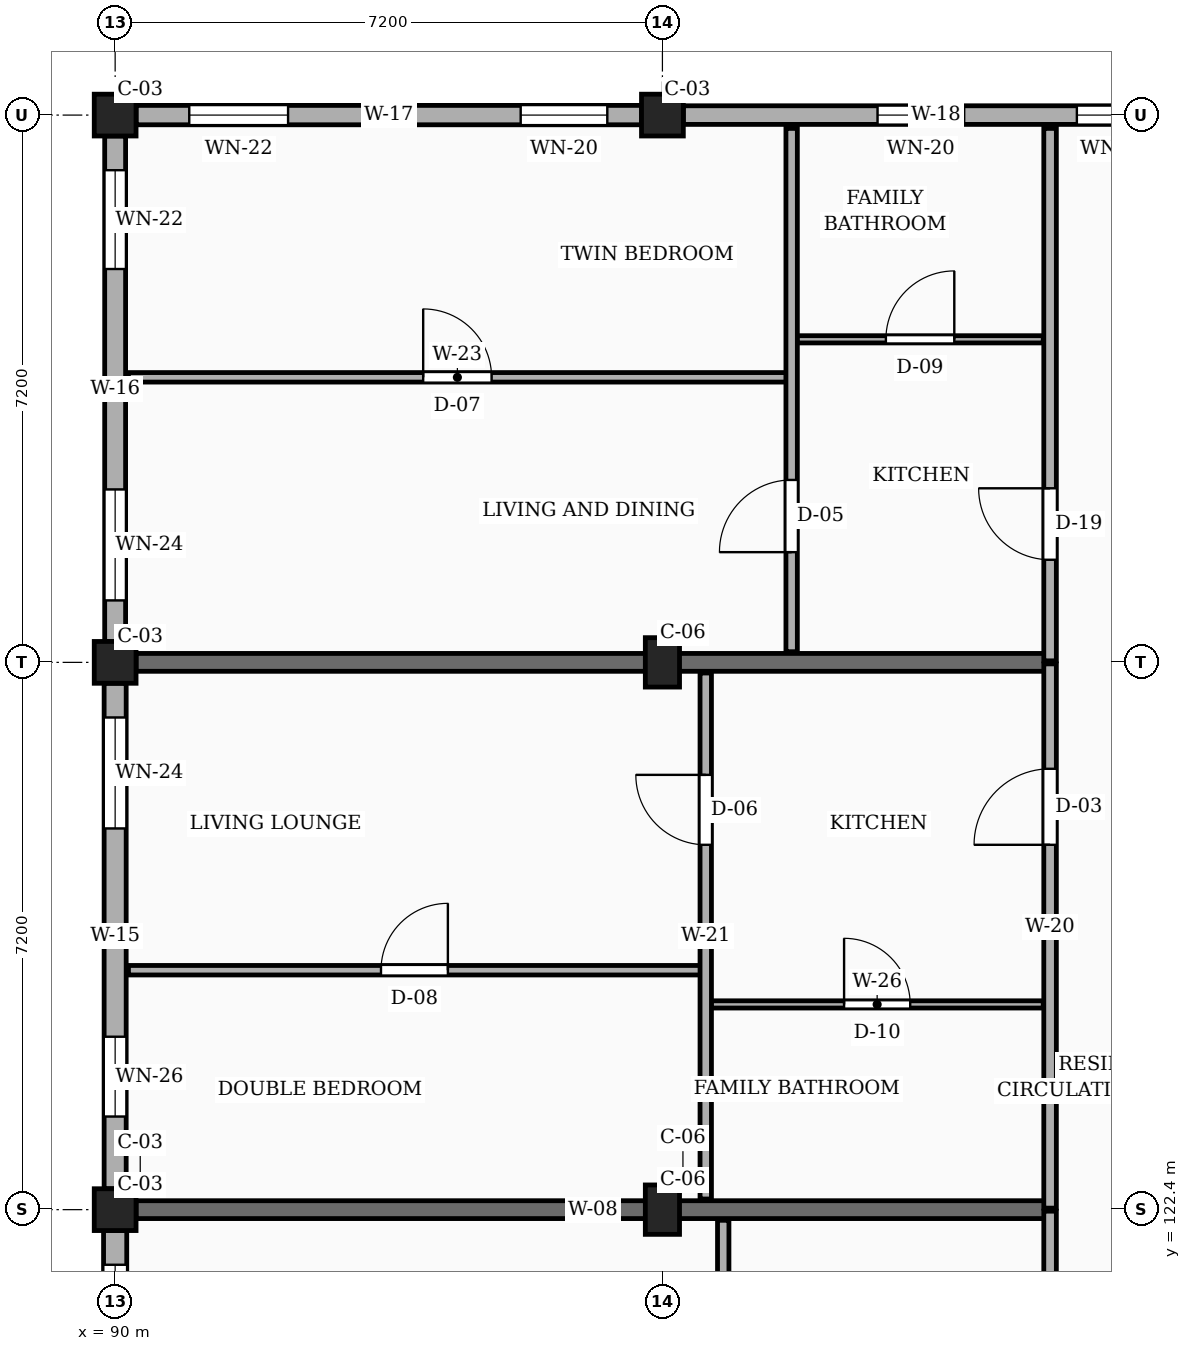
"""IFC4 building model, lengths in metres.
Left out: names, types, materials, properties, quantities, classifications, styles, units other than length and angle.
Written with IfcOpenShell. Run it as: python <this file> out.ifc"""

import sys

from ifc_helpers import new_model, si_unit, direction, frame, frame_2d, origin, origin_2d, place, context, subcontext, project, spatial, rectangle, extrude, element, fill, save


model = new_model("IFC4")
c1 = context("Model", 3, precision=1e-05, world=origin(), true_north=direction((0.0, 1.0)))
c2 = subcontext(c1, "Body", "Model", "MODEL_VIEW")
j1 = project(units=[si_unit("LENGTHUNIT", "METRE"), si_unit("PLANEANGLEUNIT", "RADIAN")], contexts=[c1])
p1 = place(None, origin())
s1 = spatial("IfcSite", under=j1, at=p1, CompositionType="ELEMENT")
p2 = place(p1, origin())
s2 = spatial("IfcBuilding", under=s1, at=p2, CompositionType="ELEMENT")
p3 = place(p2, frame((0.0, 0.0, 17.1)))
s3 = spatial("IfcBuildingStorey", under=s2, at=p3, CompositionType="ELEMENT", Elevation=17.1)
for number, where, z_axis, x_axis in (
    (1, (90.0, 122.4, 0.0), (0.0, 0.0, 1.0), (1.0, 0.0, 0.0)),
    (2, (90.0, 129.6, 0.0), (0.0, 0.0, 1.0), (1.0, 0.0, 0.0)),
    (3, (90.0, 136.8, 0.0), (0.0, 0.0, 1.0), (1.0, 0.0, 0.0)),
):
    element("IfcColumn", number, at=place(p3, frame(where, z_axis=z_axis, x_axis=x_axis)), inside=s3, PredefinedType="COLUMN", context=c2, shape_type="SweptSolid", body=[
        extrude(rectangle(XDim=0.55, YDim=0.55, at=origin_2d()), origin(), (0.0, 0.0, 1.0), 3.15),
    ])
for number, where, z_axis, x_axis in (
    (4, (97.2, 122.4, 0.0), (0.0, 0.0, 1.0), (1.0, 0.0, 0.0)),
    (5, (97.2, 129.6, 0.0), (0.0, 0.0, 1.0), (1.0, 0.0, 0.0)),
):
    element("IfcColumn", number, at=place(p3, frame(where, z_axis=z_axis, x_axis=x_axis)), inside=s3, PredefinedType="COLUMN", context=c2, shape_type="SweptSolid", body=[
        extrude(rectangle(XDim=0.45, YDim=0.65, at=origin_2d()), origin(), (0.0, 0.0, 1.0), 3.15),
    ])
p4 = place(p3, frame((97.2, 136.8, 0.0), z_axis=(0.0, 0.0, 1.0), x_axis=(1.0, 0.0, 0.0)))
e6 = element("IfcColumn", 6, at=p4, inside=s3, PredefinedType="COLUMN", context=c2, shape_type="SweptSolid", body=[
    extrude(rectangle(XDim=0.55, YDim=0.55, at=origin_2d()), origin(), (0.0, 0.0, 1.0), 3.15),
])
for number, where, z_axis, x_axis in (
    (7, (90.275, 122.4, 0.0), (0.0, 0.0, 1.0), (1.0, 0.0, 0.0)),
    (8, (90.275, 129.6, 0.0), (0.0, 0.0, 1.0), (1.0, 0.0, 0.0)),
):
    element("IfcWall", number, at=place(p3, frame(where, z_axis=z_axis, x_axis=x_axis)), inside=s3, PredefinedType="SOLIDWALL", context=c2, shape_type="SweptSolid", body=[
        extrude(rectangle(XDim=12.025, YDim=0.235, at=frame_2d((6.013, 0.0))), origin(), (0.0, 0.0, 1.0), 2.19),
    ])
p5 = place(p3, frame((104.125, 136.8, 0.0), z_axis=(0.0, 0.0, 1.0), x_axis=(-1.0, 0.0, 0.0)))
e9 = element("IfcWall", 9, at=p5, inside=s3, PredefinedType="SOLIDWALL", context=c2, shape_type="SweptSolid", body=[
    extrude(rectangle(XDim=6.65, YDim=0.245, at=frame_2d((3.325, 0.0))), origin(), (0.0, 0.0, 1.0), 2.46),
])
p6 = place(p5, frame((0.492, 0.0, 0.78)))
e10 = element("IfcOpeningElement", 10, at=p6, cuts=e9, PredefinedType="OPENING", context=c2, shape_type="SweptSolid", body=[
    extrude(rectangle(XDim=0.98, YDim=1.36, at=frame_2d((0.49, 0.68))), frame((0.0, 0.133, 0.0), z_axis=(0.0, -1.0, 0.0), x_axis=(1.0, 0.0, 0.0)), (0.0, 0.0, 1.0), 0.265),
])
p7 = place(p5, frame((2.955, 0.0, 0.78)))
e11 = element("IfcOpeningElement", 11, at=p7, cuts=e9, PredefinedType="OPENING", context=c2, shape_type="SweptSolid", body=[
    extrude(rectangle(XDim=1.14, YDim=1.36, at=frame_2d((0.57, 0.68))), frame((0.0, 0.133, 0.0), z_axis=(0.0, -1.0, 0.0), x_axis=(1.0, 0.0, 0.0)), (0.0, 0.0, 1.0), 0.265),
])
p8 = place(p3, frame((96.925, 136.8, 0.0), z_axis=(0.0, 0.0, 1.0), x_axis=(-1.0, 0.0, 0.0)))
e12 = element("IfcWall", 12, at=p8, inside=s3, PredefinedType="SOLIDWALL", context=c2, shape_type="SweptSolid", body=[
    extrude(rectangle(XDim=6.65, YDim=0.255, at=frame_2d((3.325, 0.0))), origin(), (0.0, 0.0, 1.0), 2.46),
])
p9 = place(p8, frame((0.45, 0.0, 0.78)))
e13 = element("IfcOpeningElement", 13, at=p9, cuts=e12, PredefinedType="OPENING", context=c2, shape_type="SweptSolid", body=[
    extrude(rectangle(XDim=1.14, YDim=1.36, at=frame_2d((0.57, 0.68))), frame((0.0, 0.137, 0.0), z_axis=(0.0, -1.0, 0.0), x_axis=(1.0, 0.0, 0.0)), (0.0, 0.0, 1.0), 0.275),
])
p10 = place(p8, frame((4.65, 0.0, 0.78)))
e14 = element("IfcOpeningElement", 14, at=p10, cuts=e12, PredefinedType="OPENING", context=c2, shape_type="SweptSolid", body=[
    extrude(rectangle(XDim=1.3, YDim=1.36, at=frame_2d((0.65, 0.68))), frame((0.0, 0.137, 0.0), z_axis=(0.0, -1.0, 0.0), x_axis=(1.0, 0.0, 0.0)), (0.0, 0.0, 1.0), 0.275),
])
p11 = place(p3, frame((90.0, 136.525, 0.0), z_axis=(0.0, 0.0, 1.0), x_axis=(0.0, -1.0, 0.0)))
e15 = element("IfcWall", 15, at=p11, inside=s3, PredefinedType="SOLIDWALL", context=c2, shape_type="SweptSolid", body=[
    extrude(rectangle(XDim=6.65, YDim=0.275, at=frame_2d((3.325, 0.0))), origin(), (0.0, 0.0, 1.0), 2.46),
])
p12 = place(p11, frame((0.45, 0.0, 0.78)))
e16 = element("IfcOpeningElement", 16, at=p12, cuts=e15, PredefinedType="OPENING", context=c2, shape_type="SweptSolid", body=[
    extrude(rectangle(XDim=1.3, YDim=1.36, at=frame_2d((0.65, 0.68))), frame((0.0, 0.147, 0.0), z_axis=(0.0, -1.0, 0.0), x_axis=(1.0, 0.0, 0.0)), (0.0, 0.0, 1.0), 0.295),
])
p13 = place(p11, frame((4.65, 0.0, 0.78)))
e17 = element("IfcOpeningElement", 17, at=p13, cuts=e15, PredefinedType="OPENING", context=c2, shape_type="SweptSolid", body=[
    extrude(rectangle(XDim=1.46, YDim=1.36, at=frame_2d((0.73, 0.68))), frame((0.0, 0.147, 0.0), z_axis=(0.0, -1.0, 0.0), x_axis=(1.0, 0.0, 0.0)), (0.0, 0.0, 1.0), 0.295),
])
p14 = place(p3, frame((90.0, 129.325, 0.0), z_axis=(0.0, 0.0, 1.0), x_axis=(0.0, -1.0, 0.0)))
e18 = element("IfcWall", 18, at=p14, inside=s3, PredefinedType="SOLIDWALL", context=c2, shape_type="SweptSolid", body=[
    extrude(rectangle(XDim=6.65, YDim=0.29, at=frame_2d((3.325, 0.0))), origin(), (0.0, 0.0, 1.0), 2.46),
])
p15 = place(p14, frame((0.45, 0.0, 0.78)))
e19 = element("IfcOpeningElement", 19, at=p15, cuts=e18, PredefinedType="OPENING", context=c2, shape_type="SweptSolid", body=[
    extrude(rectangle(XDim=1.46, YDim=1.36, at=frame_2d((0.73, 0.68))), frame((0.0, 0.155, 0.0), z_axis=(0.0, -1.0, 0.0), x_axis=(1.0, 0.0, 0.0)), (0.0, 0.0, 1.0), 0.31),
])
p16 = place(p14, frame((4.65, 0.0, 0.78)))
e20 = element("IfcOpeningElement", 20, at=p16, cuts=e18, PredefinedType="OPENING", context=c2, shape_type="SweptSolid", body=[
    extrude(rectangle(XDim=1.05, YDim=1.44, at=frame_2d((0.525, 0.72))), frame((0.0, 0.155, 0.0), z_axis=(0.0, -1.0, 0.0), x_axis=(1.0, 0.0, 0.0)), (0.0, 0.0, 1.0), 0.31),
])
p17 = place(p3, frame((90.0, 122.125, 0.0), z_axis=(0.0, 0.0, 1.0), x_axis=(0.0, -1.0, 0.0)))
e21 = element("IfcWall", 21, at=p17, inside=s3, PredefinedType="SOLIDWALL", context=c2, shape_type="SweptSolid", body=[
    extrude(rectangle(XDim=6.65, YDim=0.305, at=frame_2d((3.325, 0.0))), origin(), (0.0, 0.0, 1.0), 2.46),
])
p18 = place(p17, frame((0.45, 0.0, 0.78)))
e22 = element("IfcOpeningElement", 22, at=p18, cuts=e21, PredefinedType="OPENING", context=c2, shape_type="SweptSolid", body=[
    extrude(rectangle(XDim=1.05, YDim=1.44, at=frame_2d((0.525, 0.72))), frame((0.0, 0.163, 0.0), z_axis=(0.0, -1.0, 0.0), x_axis=(1.0, 0.0, 0.0)), (0.0, 0.0, 1.0), 0.325),
])
p19 = place(p17, frame((4.65, 0.0, 0.78)))
e23 = element("IfcOpeningElement", 23, at=p19, cuts=e21, PredefinedType="OPENING", context=c2, shape_type="SweptSolid", body=[
    extrude(rectangle(XDim=1.25, YDim=1.44, at=frame_2d((0.625, 0.72))), frame((0.0, 0.163, 0.0), z_axis=(0.0, -1.0, 0.0), x_axis=(1.0, 0.0, 0.0)), (0.0, 0.0, 1.0), 0.325),
])
p20 = place(p3, frame((102.3, 115.22, 0.0), z_axis=(0.0, 0.0, 1.0), x_axis=(0.0, 1.0, 0.0)))
e24 = element("IfcWall", 24, at=p20, inside=s3, PredefinedType="PARTITIONING", context=c2, shape_type="SweptSolid", body=[
    extrude(rectangle(XDim=7.16, YDim=0.165, at=frame_2d((3.58, 0.0))), origin(), (0.0, 0.0, 1.0), 2.325),
])
p21 = place(p20, frame((4.78, 0.0, 0.0)))
e25 = element("IfcOpeningElement", 25, at=p21, cuts=e24, PredefinedType="OPENING", context=c2, shape_type="SweptSolid", body=[
    extrude(rectangle(XDim=1.14, YDim=2.18, at=frame_2d((0.57, 1.09))), frame((0.0, 0.093, 0.0), z_axis=(0.0, -1.0, 0.0), x_axis=(1.0, 0.0, 0.0)), (0.0, 0.0, 1.0), 0.185),
])
p22 = place(p3, frame((102.3, 122.42, 0.0), z_axis=(0.0, 0.0, 1.0), x_axis=(0.0, 1.0, 0.0)))
e26 = element("IfcWall", 26, at=p22, inside=s3, PredefinedType="PARTITIONING", context=c2, shape_type="SweptSolid", body=[
    extrude(rectangle(XDim=7.16, YDim=0.165, at=frame_2d((3.58, 0.0))), origin(), (0.0, 0.0, 1.0), 2.325),
])
p23 = place(p22, frame((4.78, 0.0, 0.0)))
e27 = element("IfcOpeningElement", 27, at=p23, cuts=e26, PredefinedType="OPENING", context=c2, shape_type="SweptSolid", body=[
    extrude(rectangle(XDim=1.0, YDim=2.15, at=frame_2d((0.5, 1.075))), frame((0.0, 0.093, 0.0), z_axis=(0.0, -1.0, 0.0), x_axis=(1.0, 0.0, 0.0)), (0.0, 0.0, 1.0), 0.185),
])
p24 = place(p3, frame((102.3, 129.62, 0.0), z_axis=(0.0, 0.0, 1.0), x_axis=(0.0, 1.0, 0.0)))
e28 = element("IfcWall", 28, at=p24, inside=s3, PredefinedType="PARTITIONING", context=c2, shape_type="SweptSolid", body=[
    extrude(rectangle(XDim=7.005, YDim=0.165, at=frame_2d((3.502, 0.0))), origin(), (0.0, 0.0, 1.0), 2.325),
])
p25 = place(p24, frame((1.33, 0.0, 0.0)))
e29 = element("IfcOpeningElement", 29, at=p25, cuts=e28, PredefinedType="OPENING", context=c2, shape_type="SweptSolid", body=[
    extrude(rectangle(XDim=0.94, YDim=2.12, at=frame_2d((0.47, 1.06))), frame((0.0, 0.093, 0.0), z_axis=(0.0, -1.0, 0.0), x_axis=(1.0, 0.0, 0.0)), (0.0, 0.0, 1.0), 0.185),
])
p26 = place(p3, frame((98.0, 115.34, 0.0), z_axis=(0.0, 0.0, 1.0), x_axis=(0.0, 1.0, 0.0)))
e30 = element("IfcWall", 30, at=p26, inside=s3, PredefinedType="PARTITIONING", context=c2, shape_type="SweptSolid", body=[
    extrude(rectangle(XDim=6.92, YDim=0.15, at=frame_2d((3.46, 0.0))), origin(), (0.0, 0.0, 1.0), 2.325),
])
p27 = place(p26, frame((4.66, 0.0, 0.0)))
e31 = element("IfcOpeningElement", 31, at=p27, cuts=e30, PredefinedType="OPENING", context=c2, shape_type="SweptSolid", body=[
    extrude(rectangle(XDim=0.95, YDim=2.1, at=frame_2d((0.475, 1.05))), frame((0.0, 0.085, 0.0), z_axis=(0.0, -1.0, 0.0), x_axis=(1.0, 0.0, 0.0)), (0.0, 0.0, 1.0), 0.17),
])
p28 = place(p3, frame((90.175, 125.55, 0.0), z_axis=(0.0, 0.0, 1.0), x_axis=(1.0, 0.0, 0.0)))
e32 = element("IfcWall", 32, at=p28, inside=s3, PredefinedType="PARTITIONING", context=c2, shape_type="SweptSolid", body=[
    extrude(rectangle(XDim=7.525, YDim=0.125, at=frame_2d((3.762, 0.0))), origin(), (0.0, 0.0, 1.0), 2.325),
])
p29 = place(p28, frame((3.323, 0.0, 0.0)))
e33 = element("IfcOpeningElement", 33, at=p29, cuts=e32, PredefinedType="OPENING", context=c2, shape_type="SweptSolid", body=[
    extrude(rectangle(XDim=0.88, YDim=2.08, at=frame_2d((0.44, 1.04))), frame((0.0, 0.073, 0.0), z_axis=(0.0, -1.0, 0.0), x_axis=(1.0, 0.0, 0.0)), (0.0, 0.0, 1.0), 0.145),
])
p30 = place(p3, frame((97.84, 125.1, 0.0), z_axis=(0.0, 0.0, 1.0), x_axis=(1.0, 0.0, 0.0)))
e34 = element("IfcWall", 34, at=p30, inside=s3, PredefinedType="PARTITIONING", context=c2, shape_type="SweptSolid", body=[
    extrude(rectangle(XDim=4.37, YDim=0.095, at=frame_2d((2.185, 0.0))), origin(), (0.0, 0.0, 1.0), 2.325),
])
p31 = place(p30, frame((1.75, 0.0, 0.0)))
e35 = element("IfcOpeningElement", 35, at=p31, cuts=e34, PredefinedType="OPENING", context=c2, shape_type="SweptSolid", body=[
    extrude(rectangle(XDim=0.87, YDim=2.05, at=frame_2d((0.435, 1.025))), frame((0.0, 0.058, 0.0), z_axis=(0.0, -1.0, 0.0), x_axis=(1.0, 0.0, 0.0)), (0.0, 0.0, 1.0), 0.115),
])
p32 = place(p3, frame((97.77, 122.54, 0.0), z_axis=(0.0, 0.0, 1.0), x_axis=(0.0, 1.0, 0.0)))
e36 = element("IfcWall", 36, at=p32, inside=s3, PredefinedType="PARTITIONING", context=c2, shape_type="SweptSolid", body=[
    extrude(rectangle(XDim=6.92, YDim=0.15, at=frame_2d((3.46, 0.0))), origin(), (0.0, 0.0, 1.0), 2.325),
])
p33 = place(p32, frame((4.66, 0.0, 0.0)))
e37 = element("IfcOpeningElement", 37, at=p33, cuts=e36, PredefinedType="OPENING", context=c2, shape_type="SweptSolid", body=[
    extrude(rectangle(XDim=0.92, YDim=2.1, at=frame_2d((0.46, 1.05))), frame((0.0, 0.085, 0.0), z_axis=(0.0, -1.0, 0.0), x_axis=(1.0, 0.0, 0.0)), (0.0, 0.0, 1.0), 0.17),
])
p34 = place(p3, frame((90.175, 133.35, 0.0), z_axis=(0.0, 0.0, 1.0), x_axis=(1.0, 0.0, 0.0)))
e38 = element("IfcWall", 38, at=p34, inside=s3, PredefinedType="PARTITIONING", context=c2, shape_type="SweptSolid", body=[
    extrude(rectangle(XDim=8.655, YDim=0.125, at=frame_2d((4.328, 0.0))), origin(), (0.0, 0.0, 1.0), 2.325),
])
p35 = place(p34, frame((3.877, 0.0, 0.0)))
e39 = element("IfcOpeningElement", 39, at=p35, cuts=e38, PredefinedType="OPENING", context=c2, shape_type="SweptSolid", body=[
    extrude(rectangle(XDim=0.9, YDim=2.1, at=frame_2d((0.45, 1.05))), frame((0.0, 0.073, 0.0), z_axis=(0.0, -1.0, 0.0), x_axis=(1.0, 0.0, 0.0)), (0.0, 0.0, 1.0), 0.145),
])
p36 = place(p3, frame((98.97, 133.85, 0.0), z_axis=(0.0, 0.0, 1.0), x_axis=(1.0, 0.0, 0.0)))
e40 = element("IfcWall", 40, at=p36, inside=s3, PredefinedType="PARTITIONING", context=c2, shape_type="SweptSolid", body=[
    extrude(rectangle(XDim=3.24, YDim=0.095, at=frame_2d((1.62, 0.0))), origin(), (0.0, 0.0, 1.0), 2.325),
])
p37 = place(p36, frame((1.17, 0.0, 0.0)))
e41 = element("IfcOpeningElement", 41, at=p37, cuts=e40, PredefinedType="OPENING", context=c2, shape_type="SweptSolid", body=[
    extrude(rectangle(XDim=0.9, YDim=2.05, at=frame_2d((0.45, 1.025))), frame((0.0, 0.058, 0.0), z_axis=(0.0, -1.0, 0.0), x_axis=(1.0, 0.0, 0.0)), (0.0, 0.0, 1.0), 0.115),
])
p38 = place(p3, frame((98.9, 129.74, 0.0), z_axis=(0.0, 0.0, 1.0), x_axis=(0.0, 1.0, 0.0)))
e42 = element("IfcWall", 42, at=p38, inside=s3, PredefinedType="PARTITIONING", context=c2, shape_type="SweptSolid", body=[
    extrude(rectangle(XDim=6.885, YDim=0.15, at=frame_2d((3.442, 0.0))), origin(), (0.0, 0.0, 1.0), 2.325),
])
p39 = place(p38, frame((1.31, 0.0, 0.0)))
e43 = element("IfcOpeningElement", 43, at=p39, cuts=e42, PredefinedType="OPENING", context=c2, shape_type="SweptSolid", body=[
    extrude(rectangle(XDim=0.95, YDim=2.1, at=frame_2d((0.475, 1.05))), frame((0.0, 0.085, 0.0), z_axis=(0.0, -1.0, 0.0), x_axis=(1.0, 0.0, 0.0)), (0.0, 0.0, 1.0), 0.17),
])
p40 = place(p6, origin())
e44 = element("IfcWindow", 44, at=p40, inside=s3, PartitioningType="SINGLE_PANEL", PredefinedType="WINDOW", context=c2, shape_type="SweptSolid", body=[
    extrude(rectangle(XDim=0.98, YDim=1.36, at=frame_2d((0.49, 0.68))), frame((0.0, 0.03, 0.0), z_axis=(0.0, -1.0, 0.0), x_axis=(1.0, 0.0, 0.0)), (0.0, 0.0, 1.0), 0.06),
])
fill(e10, e44)
p41 = place(p7, origin())
e45 = element("IfcWindow", 45, at=p41, inside=s3, PartitioningType="SINGLE_PANEL", PredefinedType="WINDOW", context=c2, shape_type="SweptSolid", body=[
    extrude(rectangle(XDim=1.14, YDim=1.36, at=frame_2d((0.57, 0.68))), frame((0.0, 0.03, 0.0), z_axis=(0.0, -1.0, 0.0), x_axis=(1.0, 0.0, 0.0)), (0.0, 0.0, 1.0), 0.06),
])
fill(e11, e45)
p42 = place(p9, origin())
e46 = element("IfcWindow", 46, at=p42, inside=s3, PartitioningType="SINGLE_PANEL", PredefinedType="WINDOW", context=c2, shape_type="SweptSolid", body=[
    extrude(rectangle(XDim=1.14, YDim=1.36, at=frame_2d((0.57, 0.68))), frame((0.0, 0.03, 0.0), z_axis=(0.0, -1.0, 0.0), x_axis=(1.0, 0.0, 0.0)), (0.0, 0.0, 1.0), 0.06),
])
fill(e13, e46)
p43 = place(p10, origin())
e47 = element("IfcWindow", 47, at=p43, inside=s3, PartitioningType="SINGLE_PANEL", PredefinedType="WINDOW", context=c2, shape_type="SweptSolid", body=[
    extrude(rectangle(XDim=1.3, YDim=1.36, at=frame_2d((0.65, 0.68))), frame((0.0, 0.03, 0.0), z_axis=(0.0, -1.0, 0.0), x_axis=(1.0, 0.0, 0.0)), (0.0, 0.0, 1.0), 0.06),
])
fill(e14, e47)
p44 = place(p12, origin())
e48 = element("IfcWindow", 48, at=p44, inside=s3, PartitioningType="SINGLE_PANEL", PredefinedType="WINDOW", context=c2, shape_type="SweptSolid", body=[
    extrude(rectangle(XDim=1.3, YDim=1.36, at=frame_2d((0.65, 0.68))), frame((0.0, 0.03, 0.0), z_axis=(0.0, -1.0, 0.0), x_axis=(1.0, 0.0, 0.0)), (0.0, 0.0, 1.0), 0.06),
])
fill(e16, e48)
p45 = place(p13, origin())
e49 = element("IfcWindow", 49, at=p45, inside=s3, PartitioningType="SINGLE_PANEL", PredefinedType="WINDOW", context=c2, shape_type="SweptSolid", body=[
    extrude(rectangle(XDim=1.46, YDim=1.36, at=frame_2d((0.73, 0.68))), frame((0.0, 0.03, 0.0), z_axis=(0.0, -1.0, 0.0), x_axis=(1.0, 0.0, 0.0)), (0.0, 0.0, 1.0), 0.06),
])
fill(e17, e49)
p46 = place(p15, origin())
e50 = element("IfcWindow", 50, at=p46, inside=s3, PartitioningType="SINGLE_PANEL", PredefinedType="WINDOW", context=c2, shape_type="SweptSolid", body=[
    extrude(rectangle(XDim=1.46, YDim=1.36, at=frame_2d((0.73, 0.68))), frame((0.0, 0.03, 0.0), z_axis=(0.0, -1.0, 0.0), x_axis=(1.0, 0.0, 0.0)), (0.0, 0.0, 1.0), 0.06),
])
fill(e19, e50)
p47 = place(p16, origin())
e51 = element("IfcWindow", 51, at=p47, inside=s3, PartitioningType="SINGLE_PANEL", PredefinedType="WINDOW", context=c2, shape_type="SweptSolid", body=[
    extrude(rectangle(XDim=1.05, YDim=1.44, at=frame_2d((0.525, 0.72))), frame((0.0, 0.03, 0.0), z_axis=(0.0, -1.0, 0.0), x_axis=(1.0, 0.0, 0.0)), (0.0, 0.0, 1.0), 0.06),
])
fill(e20, e51)
p48 = place(p18, origin())
e52 = element("IfcWindow", 52, at=p48, inside=s3, PartitioningType="SINGLE_PANEL", PredefinedType="WINDOW", context=c2, shape_type="SweptSolid", body=[
    extrude(rectangle(XDim=1.05, YDim=1.44, at=frame_2d((0.525, 0.72))), frame((0.0, 0.03, 0.0), z_axis=(0.0, -1.0, 0.0), x_axis=(1.0, 0.0, 0.0)), (0.0, 0.0, 1.0), 0.06),
])
fill(e22, e52)
p49 = place(p23, origin())
e53 = element("IfcDoor", 53, at=p49, inside=s3, OperationType="SINGLE_SWING_LEFT", PredefinedType="DOOR", context=c2, shape_type="SweptSolid", body=[
    extrude(rectangle(XDim=1.0, YDim=2.15, at=frame_2d((0.5, 1.075))), frame((0.0, 0.025, 0.0), z_axis=(0.0, -1.0, 0.0), x_axis=(1.0, 0.0, 0.0)), (0.0, 0.0, 1.0), 0.05),
])
fill(e27, e53)
p50 = place(p25, origin())
e54 = element("IfcDoor", 54, at=p50, inside=s3, OperationType="SINGLE_SWING_RIGHT", PredefinedType="DOOR", context=c2, shape_type="SweptSolid", body=[
    extrude(rectangle(XDim=0.94, YDim=2.12, at=frame_2d((0.47, 1.06))), frame((0.0, 0.025, 0.0), z_axis=(0.0, -1.0, 0.0), x_axis=(1.0, 0.0, 0.0)), (0.0, 0.0, 1.0), 0.05),
])
fill(e29, e54)
p51 = place(p29, origin())
e55 = element("IfcDoor", 55, at=p51, inside=s3, OperationType="SINGLE_SWING_RIGHT", PredefinedType="DOOR", context=c2, shape_type="SweptSolid", body=[
    extrude(rectangle(XDim=0.88, YDim=2.08, at=frame_2d((0.44, 1.04))), frame((0.0, 0.025, 0.0), z_axis=(0.0, -1.0, 0.0), x_axis=(1.0, 0.0, 0.0)), (0.0, 0.0, 1.0), 0.05),
])
fill(e33, e55)
p52 = place(p31, origin())
e56 = element("IfcDoor", 56, at=p52, inside=s3, OperationType="SINGLE_SWING_LEFT", PredefinedType="DOOR", context=c2, shape_type="SweptSolid", body=[
    extrude(rectangle(XDim=0.87, YDim=2.05, at=frame_2d((0.435, 1.025))), frame((0.0, 0.025, 0.0), z_axis=(0.0, -1.0, 0.0), x_axis=(1.0, 0.0, 0.0)), (0.0, 0.0, 1.0), 0.05),
])
fill(e35, e56)
p53 = place(p33, origin())
e57 = element("IfcDoor", 57, at=p53, inside=s3, OperationType="SINGLE_SWING_RIGHT", PredefinedType="DOOR", context=c2, shape_type="SweptSolid", body=[
    extrude(rectangle(XDim=0.92, YDim=2.1, at=frame_2d((0.46, 1.05))), frame((0.0, 0.025, 0.0), z_axis=(0.0, -1.0, 0.0), x_axis=(1.0, 0.0, 0.0)), (0.0, 0.0, 1.0), 0.05),
])
fill(e37, e57)
p54 = place(p35, origin())
e58 = element("IfcDoor", 58, at=p54, inside=s3, OperationType="SINGLE_SWING_LEFT", PredefinedType="DOOR", context=c2, shape_type="SweptSolid", body=[
    extrude(rectangle(XDim=0.9, YDim=2.1, at=frame_2d((0.45, 1.05))), frame((0.0, 0.025, 0.0), z_axis=(0.0, -1.0, 0.0), x_axis=(1.0, 0.0, 0.0)), (0.0, 0.0, 1.0), 0.05),
])
fill(e39, e58)
p55 = place(p37, origin())
e59 = element("IfcDoor", 59, at=p55, inside=s3, OperationType="SINGLE_SWING_RIGHT", PredefinedType="DOOR", context=c2, shape_type="SweptSolid", body=[
    extrude(rectangle(XDim=0.9, YDim=2.05, at=frame_2d((0.45, 1.025))), frame((0.0, 0.025, 0.0), z_axis=(0.0, -1.0, 0.0), x_axis=(1.0, 0.0, 0.0)), (0.0, 0.0, 1.0), 0.05),
])
fill(e41, e59)
p56 = place(p39, origin())
e60 = element("IfcDoor", 60, at=p56, inside=s3, OperationType="SINGLE_SWING_LEFT", PredefinedType="DOOR", context=c2, shape_type="SweptSolid", body=[
    extrude(rectangle(XDim=0.95, YDim=2.1, at=frame_2d((0.475, 1.05))), frame((0.0, 0.025, 0.0), z_axis=(0.0, -1.0, 0.0), x_axis=(1.0, 0.0, 0.0)), (0.0, 0.0, 1.0), 0.05),
])
fill(e43, e60)
save(model, sys.argv[1])
